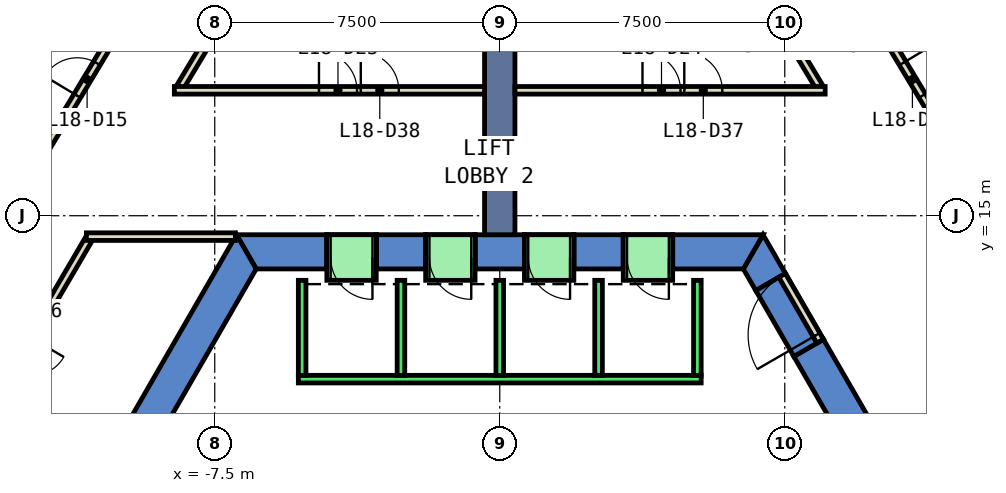
"""IFC4 building model, lengths in metres.
Left out: names, types, materials, properties, quantities, classifications, styles, units other than length and angle.
Written with IfcOpenShell. Run it as: python <this file> out.ifc"""

import sys

from ifc_helpers import new_model, si_unit, direction, frame, frame_2d, origin, place, context, subcontext, project, spatial, polyline, rectangle, outline, extrude, element, fill, save


model = new_model("IFC4")
c1 = context("Model", 3, precision=1e-05, world=origin(), true_north=direction((0.0, 1.0)))
c2 = subcontext(c1, "Body", "Model", "MODEL_VIEW")
j1 = project(units=[si_unit("LENGTHUNIT", "METRE"), si_unit("PLANEANGLEUNIT", "RADIAN")], contexts=[c1])
p1 = place(None, origin())
s1 = spatial("IfcSite", under=j1, at=p1, CompositionType="ELEMENT")
p2 = place(p1, origin())
s2 = spatial("IfcBuilding", under=s1, at=p2, CompositionType="ELEMENT")
p3 = place(p2, frame((0.0, 0.0, 86.6)))
s3 = spatial("IfcBuildingStorey", under=s2, at=p3, CompositionType="ELEMENT", Elevation=86.6)
p4 = place(p3, frame((0.0, 0.0, -0.6)))
e1 = element("IfcWall", 1, at=p4, inside=s3, PredefinedType="SHEAR", context=c2, shape_type="SweptSolid", body=[
    extrude(outline(polyline([(8.517, 11.748), (7.738, 11.298), (12.817, 2.5), (13.856, 2.5), (8.517, 11.748)])), origin(), (0.0, 0.0, 1.0), 4.4),
])
p5 = place(p3, frame((0.0, 0.0, -0.6)))
e2 = element("IfcWall", 2, at=p5, inside=s3, PredefinedType="SHEAR", context=c2, shape_type="SweptSolid", body=[
    extrude(outline(polyline([(6.738, 13.03), (7.517, 13.48), (6.928, 14.5), (6.409, 13.6), (6.738, 13.03)])), origin(), (0.0, 0.0, 1.0), 4.4),
])
p6 = place(p3, frame((0.0, 0.0, 3.6)))
e3 = element("IfcWall", 3, at=p6, inside=s3, PredefinedType="SHEAR", context=c2, shape_type="SweptSolid", body=[
    extrude(outline(polyline([(7.517, 13.48), (6.738, 13.03), (7.738, 11.298), (8.517, 11.748), (7.517, 13.48)])), origin(), (0.0, 0.0, 1.0), 0.2),
])
p7 = place(p3, frame((0.0, 0.0, -0.6)))
e4 = element("IfcWall", 4, at=p7, inside=s3, PredefinedType="SHEAR", context=c2, shape_type="SweptSolid", body=[
    extrude(outline(polyline([(4.55, 14.5), (4.55, 13.6), (6.409, 13.6), (6.928, 14.5), (4.55, 14.5)])), origin(), (0.0, 0.0, 1.0), 4.4),
])
p8 = place(p3, frame((0.0, 0.0, -0.6)))
e5 = element("IfcWall", 5, at=p8, inside=s3, PredefinedType="SHEAR", context=c2, shape_type="SweptSolid", body=[
    extrude(outline(polyline([(1.95, 14.5), (1.95, 13.6), (3.25, 13.6), (3.25, 14.5), (1.95, 14.5)])), origin(), (0.0, 0.0, 1.0), 4.4),
])
p9 = place(p3, frame((0.0, 0.0, -0.6)))
e6 = element("IfcWall", 6, at=p9, inside=s3, PredefinedType="SHEAR", context=c2, shape_type="SweptSolid", body=[
    extrude(outline(polyline([(-0.65, 14.5), (-0.65, 13.6), (0.65, 13.6), (0.65, 14.5), (-0.65, 14.5)])), origin(), (0.0, 0.0, 1.0), 4.4),
])
p10 = place(p3, frame((0.0, 0.0, -0.6)))
e7 = element("IfcWall", 7, at=p10, inside=s3, PredefinedType="SHEAR", context=c2, shape_type="SweptSolid", body=[
    extrude(outline(polyline([(-3.25, 14.5), (-3.25, 13.6), (-1.95, 13.6), (-1.95, 14.5), (-3.25, 14.5)])), origin(), (0.0, 0.0, 1.0), 4.4),
])
p11 = place(p3, frame((0.0, 0.0, -0.6)))
e8 = element("IfcWall", 8, at=p11, inside=s3, PredefinedType="SHEAR", context=c2, shape_type="SweptSolid", body=[
    extrude(outline(polyline([(-4.55, 13.6), (-4.55, 14.5), (-6.928, 14.5), (-6.409, 13.6), (-4.55, 13.6)])), origin(), (0.0, 0.0, 1.0), 4.4),
])
p12 = place(p3, frame((0.0, 0.0, 3.6)))
e9 = element("IfcWall", 9, at=p12, inside=s3, PredefinedType="SHEAR", context=c2, shape_type="SweptSolid", body=[
    extrude(outline(polyline([(3.25, 14.5), (3.25, 13.6), (4.55, 13.6), (4.55, 14.5), (3.25, 14.5)])), origin(), (0.0, 0.0, 1.0), 0.2),
])
p13 = place(p3, frame((0.0, 0.0, 3.6)))
e10 = element("IfcWall", 10, at=p13, inside=s3, PredefinedType="SHEAR", context=c2, shape_type="SweptSolid", body=[
    extrude(outline(polyline([(0.65, 14.5), (0.65, 13.6), (1.95, 13.6), (1.95, 14.5), (0.65, 14.5)])), origin(), (0.0, 0.0, 1.0), 0.2),
])
p14 = place(p3, frame((0.0, 0.0, 3.6)))
e11 = element("IfcWall", 11, at=p14, inside=s3, PredefinedType="SHEAR", context=c2, shape_type="SweptSolid", body=[
    extrude(outline(polyline([(-1.95, 14.5), (-1.95, 13.6), (-0.65, 13.6), (-0.65, 14.5), (-1.95, 14.5)])), origin(), (0.0, 0.0, 1.0), 0.2),
])
p15 = place(p3, frame((0.0, 0.0, 3.6)))
e12 = element("IfcWall", 12, at=p15, inside=s3, PredefinedType="SHEAR", context=c2, shape_type="SweptSolid", body=[
    extrude(outline(polyline([(-4.55, 14.5), (-4.55, 13.6), (-3.25, 13.6), (-3.25, 14.5), (-4.55, 14.5)])), origin(), (0.0, 0.0, 1.0), 0.2),
])
p16 = place(p3, frame((0.0, 0.0, -0.6)))
e13 = element("IfcWall", 13, at=p16, inside=s3, PredefinedType="SHEAR", context=c2, shape_type="SweptSolid", body=[
    extrude(outline(polyline([(-12.267, 5.252), (-11.488, 4.802), (-6.409, 13.6), (-6.928, 14.5), (-12.267, 5.252)])), origin(), (0.0, 0.0, 1.0), 4.4),
])
p17 = place(p3, frame((0.0, 14.5, -0.6), z_axis=(0.0, 0.0, 1.0), x_axis=(0.0, 1.0, 0.0)))
e14 = element("IfcWall", 14, at=p17, inside=s3, PredefinedType="SHEAR", context=c2, shape_type="SweptSolid", body=[
    extrude(rectangle(XDim=9.0, YDim=0.8, at=frame_2d((4.5, 0.0))), origin(), (0.0, 0.0, 1.0), 4.4),
])
for number, where, z_axis, x_axis in (
    (15, (8.411, 18.386, 0.0), (0.0, 0.0, 1.0), (-0.515, 0.857, 0.0)),
    (16, (-7.148, 20.488, 0.0), (0.0, 0.0, 1.0), (-0.515, -0.857, 0.0)),
):
    element("IfcWall", number, at=place(p3, frame(where, z_axis=z_axis, x_axis=x_axis)), inside=s3, PredefinedType="PARTITIONING", context=c2, shape_type="SweptSolid", body=[
        extrude(rectangle(XDim=2.452, YDim=0.2, at=frame_2d((1.226, 0.0))), origin(), (0.0, 0.0, 1.0), 3.8),
    ])
p18 = place(p3, frame((-10.797, 14.415, 0.0), z_axis=(0.0, 0.0, 1.0), x_axis=(-0.505008297342, -0.863114488128, 0.0)))
e17 = element("IfcWall", 17, at=p18, inside=s3, PredefinedType="PARTITIONING", context=c2, shape_type="SweptSolid", body=[
    extrude(rectangle(XDim=7.085, YDim=0.2, at=frame_2d((3.542, 0.0))), origin(), (0.0, 0.0, 1.0), 3.8),
])
p19 = place(p18, frame((3.043, 0.0, 0.0)))
e18 = element("IfcOpeningElement", 18, at=p19, cuts=e17, PredefinedType="OPENING", context=c2, shape_type="SweptSolid", body=[
    extrude(rectangle(XDim=1.0, YDim=2.1, at=frame_2d((0.5, 1.05))), frame((0.0, 0.11, 0.0), z_axis=(0.0, -1.0, 0.0), x_axis=(1.0, 0.0, 0.0)), (0.0, 0.0, 1.0), 0.22),
])
p20 = place(p3, frame((8.989, 21.696, 0.0), z_axis=(0.0, 0.0, 1.0), x_axis=(0.515000602442, -0.857189815318, 0.0)))
e19 = element("IfcWall", 19, at=p20, inside=s3, PredefinedType="PARTITIONING", context=c2, shape_type="SweptSolid", body=[
    extrude(rectangle(XDim=7.11, YDim=0.2, at=frame_2d((3.555, 0.0))), origin(), (0.0, 0.0, 1.0), 3.8),
])
p21 = place(p20, frame((3.13, 0.0, 0.0)))
e20 = element("IfcOpeningElement", 20, at=p21, cuts=e19, PredefinedType="OPENING", context=c2, shape_type="SweptSolid", body=[
    extrude(rectangle(XDim=1.0, YDim=2.1, at=frame_2d((0.5, 1.05))), frame((0.0, 0.11, 0.0), z_axis=(0.0, -1.0, 0.0), x_axis=(1.0, 0.0, 0.0)), (0.0, 0.0, 1.0), 0.22),
])
p22 = place(p3, frame((-12.728, 15.473, 0.0), z_axis=(0.0, 0.0, 1.0), x_axis=(0.515010673306, 0.857183764651, 0.0)))
e21 = element("IfcWall", 21, at=p22, inside=s3, PredefinedType="PARTITIONING", context=c2, shape_type="SweptSolid", body=[
    extrude(rectangle(XDim=7.111, YDim=0.2, at=frame_2d((3.555, 0.0))), origin(), (0.0, 0.0, 1.0), 3.8),
])
p23 = place(p22, frame((3.13, 0.0, 0.0)))
e22 = element("IfcOpeningElement", 22, at=p23, cuts=e21, PredefinedType="OPENING", context=c2, shape_type="SweptSolid", body=[
    extrude(rectangle(XDim=1.0, YDim=2.1, at=frame_2d((0.5, 1.05))), frame((0.0, 0.11, 0.0), z_axis=(0.0, -1.0, 0.0), x_axis=(1.0, 0.0, 0.0)), (0.0, 0.0, 1.0), 0.22),
])
p24 = place(p3, frame((0.4, 18.3, 0.0), z_axis=(0.0, 0.0, 1.0), x_axis=(1.0, 0.0, 0.0)))
e23 = element("IfcWall", 23, at=p24, inside=s3, PredefinedType="PARTITIONING", context=c2, shape_type="SweptSolid", body=[
    extrude(rectangle(XDim=8.163, YDim=0.2, at=frame_2d((4.082, 0.0))), origin(), (0.0, 0.0, 1.0), 3.8),
])
p25 = place(p24, frame((3.356, 0.0, 0.0)))
e24 = element("IfcOpeningElement", 24, at=p25, cuts=e23, PredefinedType="OPENING", context=c2, shape_type="SweptSolid", body=[
    extrude(rectangle(XDim=1.0, YDim=2.1, at=frame_2d((0.5, 1.05))), frame((0.0, 0.11, 0.0), z_axis=(0.0, -1.0, 0.0), x_axis=(1.0, 0.0, 0.0)), (0.0, 0.0, 1.0), 0.22),
])
p26 = place(p24, frame((4.456, 0.0, 0.0)))
e25 = element("IfcOpeningElement", 25, at=p26, cuts=e23, PredefinedType="OPENING", context=c2, shape_type="SweptSolid", body=[
    extrude(rectangle(XDim=1.0, YDim=2.1, at=frame_2d((0.5, 1.05))), frame((0.0, 0.11, 0.0), z_axis=(0.0, -1.0, 0.0), x_axis=(1.0, 0.0, 0.0)), (0.0, 0.0, 1.0), 0.22),
])
p27 = place(p3, frame((-8.563, 18.3, 0.0), z_axis=(0.0, 0.0, 1.0), x_axis=(1.0, 0.0, 0.0)))
e26 = element("IfcWall", 26, at=p27, inside=s3, PredefinedType="PARTITIONING", context=c2, shape_type="SweptSolid", body=[
    extrude(rectangle(XDim=8.163, YDim=0.2, at=frame_2d((4.082, 0.0))), origin(), (0.0, 0.0, 1.0), 3.8),
])
p28 = place(p27, frame((3.806, 0.0, 0.0)))
e27 = element("IfcOpeningElement", 27, at=p28, cuts=e26, PredefinedType="OPENING", context=c2, shape_type="SweptSolid", body=[
    extrude(rectangle(XDim=1.0, YDim=2.1, at=frame_2d((0.5, 1.05))), frame((0.0, 0.11, 0.0), z_axis=(0.0, -1.0, 0.0), x_axis=(1.0, 0.0, 0.0)), (0.0, 0.0, 1.0), 0.22),
])
p29 = place(p27, frame((4.906, 0.0, 0.0)))
e28 = element("IfcOpeningElement", 28, at=p29, cuts=e26, PredefinedType="OPENING", context=c2, shape_type="SweptSolid", body=[
    extrude(rectangle(XDim=1.0, YDim=2.1, at=frame_2d((0.5, 1.05))), frame((0.0, 0.11, 0.0), z_axis=(0.0, -1.0, 0.0), x_axis=(1.0, 0.0, 0.0)), (0.0, 0.0, 1.0), 0.22),
])
p30 = place(p3, frame((-6.957, 14.45, 0.0), z_axis=(0.0, 0.0, 1.0), x_axis=(-1.0, 0.0, 0.0)))
e29 = element("IfcWall", 29, at=p30, inside=s3, PredefinedType="PARTITIONING", context=c2, shape_type="SweptSolid", body=[
    extrude(rectangle(XDim=3.92, YDim=0.2, at=frame_2d((1.96, 0.0))), origin(), (0.0, 0.0, 1.0), 3.8),
])
p31 = place(p3, frame((8.43, 11.698, 0.0), z_axis=(0.0, 0.0, 1.0), x_axis=(-0.50002537861, 0.866010750942, 0.0)))
e30 = element("IfcWall", 30, at=p31, inside=s3, PredefinedType="PARTITIONING", context=c2, shape_type="SweptSolid", body=[
    extrude(rectangle(XDim=2.0, YDim=0.2, at=frame_2d((1.0, 0.0))), origin(), (0.0, 0.0, 1.0), 2.4),
])
p32 = place(p31, frame((0.19, 0.0, 0.0)))
e31 = element("IfcOpeningElement", 31, at=p32, cuts=e30, PredefinedType="OPENING", context=c2, shape_type="SweptSolid", body=[
    extrude(rectangle(XDim=1.8, YDim=2.1, at=frame_2d((0.9, 1.05))), frame((0.0, 0.11, 0.0), z_axis=(0.0, -1.0, 0.0), x_axis=(1.0, 0.0, 0.0)), (0.0, 0.0, 1.0), 0.22),
])
p33 = place(p3, frame((5.3, 10.7, 0.0), z_axis=(0.0, 0.0, 1.0), x_axis=(-1.0, 0.0, 0.0)))
e32 = element("IfcWall", 32, at=p33, inside=s3, PredefinedType="STANDARD", context=c2, shape_type="SweptSolid", body=[
    extrude(rectangle(XDim=10.6, YDim=0.2, at=frame_2d((5.3, 0.0))), origin(), (0.0, 0.0, 1.0), 3.8),
])
for number, where, z_axis, x_axis in (
    (33, (5.2, 10.8, 0.0), (0.0, 0.0, 1.0), (0.0, 1.0, 0.0)),
    (34, (2.6, 10.8, 0.0), (0.0, 0.0, 1.0), (0.0, 1.0, 0.0)),
    (35, (0.0, 10.8, 0.0), (0.0, 0.0, 1.0), (0.0, 1.0, 0.0)),
    (36, (-2.6, 10.8, 0.0), (0.0, 0.0, 1.0), (0.0, 1.0, 0.0)),
    (37, (-5.2, 10.8, 0.0), (0.0, 0.0, 1.0), (0.0, 1.0, 0.0)),
):
    element("IfcWall", number, at=place(p3, frame(where, z_axis=z_axis, x_axis=x_axis)), inside=s3, PredefinedType="STANDARD", context=c2, shape_type="SweptSolid", body=[
        extrude(rectangle(XDim=2.5, YDim=0.2, at=frame_2d((1.25, 0.0))), origin(), (0.0, 0.0, 1.0), 3.8),
    ])
p34 = place(p3, frame((4.55, 13.9, 0.0), z_axis=(0.0, 0.0, 1.0), x_axis=(-1.0, 0.0, 0.0)))
e38 = element("IfcWall", 38, at=p34, inside=s3, PredefinedType="STANDARD", context=c2, shape_type="SweptSolid", body=[
    extrude(rectangle(XDim=1.3, YDim=1.2, at=frame_2d((0.65, 0.0))), origin(), (0.0, 0.0, 1.0), 2.4),
])
p35 = place(p34, frame((0.1, 0.0, 0.0)))
e39 = element("IfcOpeningElement", 39, at=p35, cuts=e38, PredefinedType="OPENING", context=c2, shape_type="SweptSolid", body=[
    extrude(rectangle(XDim=1.1, YDim=2.3, at=frame_2d((0.55, 1.15))), frame((0.0, 0.61, 0.0), z_axis=(0.0, -1.0, 0.0), x_axis=(1.0, 0.0, 0.0)), (0.0, 0.0, 1.0), 1.22),
])
p36 = place(p3, frame((1.95, 13.9, 0.0), z_axis=(0.0, 0.0, 1.0), x_axis=(-1.0, 0.0, 0.0)))
e40 = element("IfcWall", 40, at=p36, inside=s3, PredefinedType="STANDARD", context=c2, shape_type="SweptSolid", body=[
    extrude(rectangle(XDim=1.3, YDim=1.2, at=frame_2d((0.65, 0.0))), origin(), (0.0, 0.0, 1.0), 2.4),
])
p37 = place(p36, frame((0.1, 0.0, 0.0)))
e41 = element("IfcOpeningElement", 41, at=p37, cuts=e40, PredefinedType="OPENING", context=c2, shape_type="SweptSolid", body=[
    extrude(rectangle(XDim=1.1, YDim=2.3, at=frame_2d((0.55, 1.15))), frame((0.0, 0.61, 0.0), z_axis=(0.0, -1.0, 0.0), x_axis=(1.0, 0.0, 0.0)), (0.0, 0.0, 1.0), 1.22),
])
p38 = place(p3, frame((-0.65, 13.9, 0.0), z_axis=(0.0, 0.0, 1.0), x_axis=(-1.0, 0.0, 0.0)))
e42 = element("IfcWall", 42, at=p38, inside=s3, PredefinedType="STANDARD", context=c2, shape_type="SweptSolid", body=[
    extrude(rectangle(XDim=1.3, YDim=1.2, at=frame_2d((0.65, 0.0))), origin(), (0.0, 0.0, 1.0), 2.4),
])
p39 = place(p38, frame((0.1, 0.0, 0.0)))
e43 = element("IfcOpeningElement", 43, at=p39, cuts=e42, PredefinedType="OPENING", context=c2, shape_type="SweptSolid", body=[
    extrude(rectangle(XDim=1.1, YDim=2.3, at=frame_2d((0.55, 1.15))), frame((0.0, 0.61, 0.0), z_axis=(0.0, -1.0, 0.0), x_axis=(1.0, 0.0, 0.0)), (0.0, 0.0, 1.0), 1.22),
])
p40 = place(p3, frame((-3.25, 13.9, 0.0), z_axis=(0.0, 0.0, 1.0), x_axis=(-1.0, 0.0, 0.0)))
e44 = element("IfcWall", 44, at=p40, inside=s3, PredefinedType="STANDARD", context=c2, shape_type="SweptSolid", body=[
    extrude(rectangle(XDim=1.3, YDim=1.2, at=frame_2d((0.65, 0.0))), origin(), (0.0, 0.0, 1.0), 2.4),
])
p41 = place(p40, frame((0.1, 0.0, 0.0)))
e45 = element("IfcOpeningElement", 45, at=p41, cuts=e44, PredefinedType="OPENING", context=c2, shape_type="SweptSolid", body=[
    extrude(rectangle(XDim=1.1, YDim=2.3, at=frame_2d((0.55, 1.15))), frame((0.0, 0.61, 0.0), z_axis=(0.0, -1.0, 0.0), x_axis=(1.0, 0.0, 0.0)), (0.0, 0.0, 1.0), 1.22),
])
p42 = place(p21, origin())
e46 = element("IfcDoor", 46, at=p42, inside=s3, OperationType="SINGLE_SWING_LEFT", PredefinedType="DOOR", context=c2, shape_type="SweptSolid", body=[
    extrude(rectangle(XDim=1.0, YDim=2.1, at=frame_2d((0.5, 1.05))), frame((0.0, 0.025, 0.0), z_axis=(0.0, -1.0, 0.0), x_axis=(1.0, 0.0, 0.0)), (0.0, 0.0, 1.0), 0.05),
])
fill(e20, e46)
p43 = place(p23, origin())
e47 = element("IfcDoor", 47, at=p43, inside=s3, OperationType="SINGLE_SWING_LEFT", PredefinedType="DOOR", context=c2, shape_type="SweptSolid", body=[
    extrude(rectangle(XDim=1.0, YDim=2.1, at=frame_2d((0.5, 1.05))), frame((0.0, 0.025, 0.0), z_axis=(0.0, -1.0, 0.0), x_axis=(1.0, 0.0, 0.0)), (0.0, 0.0, 1.0), 0.05),
])
fill(e22, e47)
p44 = place(p25, origin())
e48 = element("IfcDoor", 48, at=p44, inside=s3, OperationType="SINGLE_SWING_RIGHT", PredefinedType="DOOR", context=c2, shape_type="SweptSolid", body=[
    extrude(rectangle(XDim=1.0, YDim=2.1, at=frame_2d((0.5, 1.05))), frame((0.0, 0.025, 0.0), z_axis=(0.0, -1.0, 0.0), x_axis=(1.0, 0.0, 0.0)), (0.0, 0.0, 1.0), 0.05),
])
fill(e24, e48)
p45 = place(p28, origin())
e49 = element("IfcDoor", 49, at=p45, inside=s3, OperationType="SINGLE_SWING_RIGHT", PredefinedType="DOOR", context=c2, shape_type="SweptSolid", body=[
    extrude(rectangle(XDim=1.0, YDim=2.1, at=frame_2d((0.5, 1.05))), frame((0.0, 0.025, 0.0), z_axis=(0.0, -1.0, 0.0), x_axis=(1.0, 0.0, 0.0)), (0.0, 0.0, 1.0), 0.05),
])
fill(e27, e49)
p46 = place(p26, origin())
e50 = element("IfcDoor", 50, at=p46, inside=s3, OperationType="SINGLE_SWING_RIGHT", PredefinedType="DOOR", context=c2, shape_type="SweptSolid", body=[
    extrude(rectangle(XDim=1.0, YDim=2.1, at=frame_2d((0.5, 1.05))), frame((0.0, 0.025, 0.0), z_axis=(0.0, -1.0, 0.0), x_axis=(1.0, 0.0, 0.0)), (0.0, 0.0, 1.0), 0.05),
])
fill(e25, e50)
p47 = place(p29, origin())
e51 = element("IfcDoor", 51, at=p47, inside=s3, OperationType="SINGLE_SWING_RIGHT", PredefinedType="DOOR", context=c2, shape_type="SweptSolid", body=[
    extrude(rectangle(XDim=1.0, YDim=2.1, at=frame_2d((0.5, 1.05))), frame((0.0, 0.025, 0.0), z_axis=(0.0, -1.0, 0.0), x_axis=(1.0, 0.0, 0.0)), (0.0, 0.0, 1.0), 0.05),
])
fill(e28, e51)
p48 = place(p32, origin())
e52 = element("IfcDoor", 52, at=p48, inside=s3, OperationType="DOUBLE_DOOR_SINGLE_SWING", PredefinedType="DOOR", context=c2, shape_type="SweptSolid", body=[
    extrude(rectangle(XDim=1.8, YDim=2.1, at=frame_2d((0.9, 1.05))), frame((0.0, 0.025, 0.0), z_axis=(0.0, -1.0, 0.0), x_axis=(1.0, 0.0, 0.0)), (0.0, 0.0, 1.0), 0.05),
])
fill(e31, e52)
p49 = place(p35, origin())
e53 = element("IfcDoor", 53, at=p49, inside=s3, OperationType="SLIDING_TO_LEFT", PredefinedType="DOOR", context=c2, shape_type="SweptSolid", body=[
    extrude(rectangle(XDim=1.1, YDim=2.3, at=frame_2d((0.55, 1.15))), frame((0.0, 0.025, 0.0), z_axis=(0.0, -1.0, 0.0), x_axis=(1.0, 0.0, 0.0)), (0.0, 0.0, 1.0), 0.05),
])
fill(e39, e53)
p50 = place(p37, origin())
e54 = element("IfcDoor", 54, at=p50, inside=s3, OperationType="SLIDING_TO_LEFT", PredefinedType="DOOR", context=c2, shape_type="SweptSolid", body=[
    extrude(rectangle(XDim=1.1, YDim=2.3, at=frame_2d((0.55, 1.15))), frame((0.0, 0.025, 0.0), z_axis=(0.0, -1.0, 0.0), x_axis=(1.0, 0.0, 0.0)), (0.0, 0.0, 1.0), 0.05),
])
fill(e41, e54)
p51 = place(p39, origin())
e55 = element("IfcDoor", 55, at=p51, inside=s3, OperationType="SLIDING_TO_LEFT", PredefinedType="DOOR", context=c2, shape_type="SweptSolid", body=[
    extrude(rectangle(XDim=1.1, YDim=2.3, at=frame_2d((0.55, 1.15))), frame((0.0, 0.025, 0.0), z_axis=(0.0, -1.0, 0.0), x_axis=(1.0, 0.0, 0.0)), (0.0, 0.0, 1.0), 0.05),
])
fill(e43, e55)
p52 = place(p41, origin())
e56 = element("IfcDoor", 56, at=p52, inside=s3, OperationType="SLIDING_TO_LEFT", PredefinedType="DOOR", context=c2, shape_type="SweptSolid", body=[
    extrude(rectangle(XDim=1.1, YDim=2.3, at=frame_2d((0.55, 1.15))), frame((0.0, 0.025, 0.0), z_axis=(0.0, -1.0, 0.0), x_axis=(1.0, 0.0, 0.0)), (0.0, 0.0, 1.0), 0.05),
])
fill(e45, e56)
save(model, sys.argv[1])
